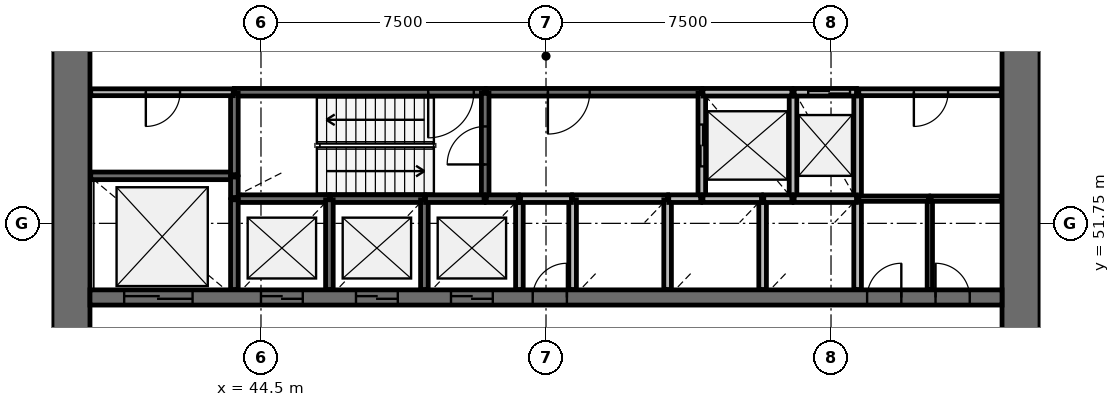
"""IFC4 building model, lengths in metres.
Left out: names, types, materials, properties, quantities, classifications, styles, units other than length and angle.
Written with IfcOpenShell. Run it as: python <this file> out.ifc"""

import sys

from ifc_helpers import new_model, si_unit, direction, frame, frame_2d, origin, place, context, subcontext, project, spatial, rectangle, extrude, source, transform, mapped, element, fill, save


model = new_model("IFC4")
c1 = context("Model", 3, precision=1e-05, world=origin(), true_north=direction((0.0, 1.0)))
c2 = subcontext(c1, "Body", "Model", "MODEL_VIEW")
j1 = project(units=[si_unit("LENGTHUNIT", "METRE"), si_unit("PLANEANGLEUNIT", "RADIAN")], contexts=[c1])
p1 = place(None, origin())
s1 = spatial("IfcSite", under=j1, at=p1, CompositionType="ELEMENT")
p2 = place(p1, origin())
s2 = spatial("IfcBuilding", under=s1, at=p2, CompositionType="ELEMENT")
p3 = place(p2, frame((0.0, 0.0, 35.8)))
s3 = spatial("IfcBuildingStorey", under=s2, at=p3, CompositionType="ELEMENT", Elevation=35.8)
p4 = place(p3, frame((64.5, 38.0, 0.0), z_axis=(0.0, 0.0, 1.0), x_axis=(0.0, 1.0, 0.0)))
e1 = element("IfcWall", 1, at=p4, inside=s3, PredefinedType="SHEAR", context=c2, shape_type="SweptSolid", body=[
    extrude(rectangle(XDim=20.0, YDim=1.0, at=frame_2d((10.0, 0.0))), origin(), (0.0, 0.0, 1.0), 4.4),
])
p5 = place(p4, frame((9.1, 0.0, 0.0)))
e2 = element("IfcOpeningElement", 2, at=p5, cuts=e1, PredefinedType="OPENING", context=c2, shape_type="SweptSolid", body=[
    extrude(rectangle(XDim=1.8, YDim=2.1, at=frame_2d((0.9, 1.05))), frame((0.0, 0.51, 0.0), z_axis=(0.0, -1.0, 0.0), x_axis=(1.0, 0.0, 0.0)), (0.0, 0.0, 1.0), 1.02),
])
p6 = place(p3, frame((39.5, 58.0, 0.0), z_axis=(0.0, 0.0, 1.0), x_axis=(0.0, -1.0, 0.0)))
e3 = element("IfcWall", 3, at=p6, inside=s3, PredefinedType="SHEAR", context=c2, shape_type="SweptSolid", body=[
    extrude(rectangle(XDim=20.0, YDim=1.0, at=frame_2d((10.0, 0.0))), origin(), (0.0, 0.0, 1.0), 4.4),
])
p7 = place(p6, frame((9.1, 0.0, 0.0)))
e4 = element("IfcOpeningElement", 4, at=p7, cuts=e3, PredefinedType="OPENING", context=c2, shape_type="SweptSolid", body=[
    extrude(rectangle(XDim=1.8, YDim=2.1, at=frame_2d((0.9, 1.05))), frame((0.0, 0.51, 0.0), z_axis=(0.0, -1.0, 0.0), x_axis=(1.0, 0.0, 0.0)), (0.0, 0.0, 1.0), 1.02),
])
p8 = place(p3, frame((40.0, 49.8, 0.0), z_axis=(0.0, 0.0, 1.0), x_axis=(1.0, 0.0, 0.0)))
e5 = element("IfcWall", 5, at=p8, inside=s3, PredefinedType="SHEAR", context=c2, shape_type="SweptSolid", body=[
    extrude(rectangle(XDim=24.0, YDim=0.4, at=frame_2d((12.0, 0.0))), origin(), (0.0, 0.0, 1.0), 4.4),
])
p9 = place(p8, frame((4.5, 0.0, 0.0)))
e6 = element("IfcOpeningElement", 6, at=p9, cuts=e5, PredefinedType="OPENING", context=c2, shape_type="SweptSolid", body=[
    extrude(rectangle(XDim=1.1, YDim=2.1, at=frame_2d((0.55, 1.05))), frame((0.0, 0.21, 0.0), z_axis=(0.0, -1.0, 0.0), x_axis=(1.0, 0.0, 0.0)), (0.0, 0.0, 1.0), 0.42),
])
p10 = place(p8, frame((7.0, 0.0, 0.0)))
e7 = element("IfcOpeningElement", 7, at=p10, cuts=e5, PredefinedType="OPENING", context=c2, shape_type="SweptSolid", body=[
    extrude(rectangle(XDim=1.1, YDim=2.1, at=frame_2d((0.55, 1.05))), frame((0.0, 0.21, 0.0), z_axis=(0.0, -1.0, 0.0), x_axis=(1.0, 0.0, 0.0)), (0.0, 0.0, 1.0), 0.42),
])
p11 = place(p8, frame((9.5, 0.0, 0.0)))
e8 = element("IfcOpeningElement", 8, at=p11, cuts=e5, PredefinedType="OPENING", context=c2, shape_type="SweptSolid", body=[
    extrude(rectangle(XDim=1.1, YDim=2.1, at=frame_2d((0.55, 1.05))), frame((0.0, 0.21, 0.0), z_axis=(0.0, -1.0, 0.0), x_axis=(1.0, 0.0, 0.0)), (0.0, 0.0, 1.0), 0.42),
])
p12 = place(p8, frame((0.9, 0.0, 0.0)))
e9 = element("IfcOpeningElement", 9, at=p12, cuts=e5, PredefinedType="OPENING", context=c2, shape_type="SweptSolid", body=[
    extrude(rectangle(XDim=1.8, YDim=2.4, at=frame_2d((0.9, 1.2))), frame((0.0, 0.21, 0.0), z_axis=(0.0, -1.0, 0.0), x_axis=(1.0, 0.0, 0.0)), (0.0, 0.0, 1.0), 0.42),
])
p13 = place(p8, frame((20.45, 0.0, 0.0)))
e10 = element("IfcOpeningElement", 10, at=p13, cuts=e5, PredefinedType="OPENING", context=c2, shape_type="SweptSolid", body=[
    extrude(rectangle(XDim=0.9, YDim=2.1, at=frame_2d((0.45, 1.05))), frame((0.0, 0.21, 0.0), z_axis=(0.0, -1.0, 0.0), x_axis=(1.0, 0.0, 0.0)), (0.0, 0.0, 1.0), 0.42),
])
p14 = place(p8, frame((22.25, 0.0, 0.0)))
e11 = element("IfcOpeningElement", 11, at=p14, cuts=e5, PredefinedType="OPENING", context=c2, shape_type="SweptSolid", body=[
    extrude(rectangle(XDim=0.9, YDim=2.1, at=frame_2d((0.45, 1.05))), frame((0.0, 0.21, 0.0), z_axis=(0.0, -1.0, 0.0), x_axis=(1.0, 0.0, 0.0)), (0.0, 0.0, 1.0), 0.42),
])
p15 = place(p8, frame((11.65, 0.0, 0.0)))
e12 = element("IfcOpeningElement", 12, at=p15, cuts=e5, PredefinedType="OPENING", context=c2, shape_type="SweptSolid", body=[
    extrude(rectangle(XDim=0.9, YDim=2.1, at=frame_2d((0.45, 1.05))), frame((0.0, 0.21, 0.0), z_axis=(0.0, -1.0, 0.0), x_axis=(1.0, 0.0, 0.0)), (0.0, 0.0, 1.0), 0.42),
])
p16 = place(p3, frame((50.4, 55.2, 0.0), z_axis=(0.0, 0.0, 1.0), x_axis=(-1.0, 0.0, 0.0)))
e13 = element("IfcWall", 13, at=p16, inside=s3, PredefinedType="SOLIDWALL", context=c2, shape_type="SweptSolid", body=[
    extrude(rectangle(XDim=6.6, YDim=0.2, at=frame_2d((3.3, 0.0))), origin(), (0.0, 0.0, 1.0), 3.95),
])
p17 = place(p16, frame((0.3, 0.0, 0.0)))
e14 = element("IfcOpeningElement", 14, at=p17, cuts=e13, PredefinedType="OPENING", context=c2, shape_type="SweptSolid", body=[
    extrude(rectangle(XDim=1.2, YDim=2.1, at=frame_2d((0.6, 1.05))), frame((0.0, 0.11, 0.0), z_axis=(0.0, -1.0, 0.0), x_axis=(1.0, 0.0, 0.0)), (0.0, 0.0, 1.0), 0.22),
])
p18 = place(p3, frame((56.1, 55.2, 0.0), z_axis=(0.0, 0.0, 1.0), x_axis=(-1.0, 0.0, 0.0)))
e15 = element("IfcWall", 15, at=p18, inside=s3, PredefinedType="SOLIDWALL", context=c2, shape_type="SweptSolid", body=[
    extrude(rectangle(XDim=5.67, YDim=0.2, at=frame_2d((2.835, 0.0))), origin(), (0.0, 0.0, 1.0), 3.95),
])
p19 = place(p18, frame((2.95, 0.0, 0.0)))
e16 = element("IfcOpeningElement", 16, at=p19, cuts=e15, PredefinedType="OPENING", context=c2, shape_type="SweptSolid", body=[
    extrude(rectangle(XDim=1.1, YDim=2.1, at=frame_2d((0.55, 1.05))), frame((0.0, 0.11, 0.0), z_axis=(0.0, -1.0, 0.0), x_axis=(1.0, 0.0, 0.0)), (0.0, 0.0, 1.0), 0.22),
])
p20 = place(p3, frame((43.8, 53.0, 0.0), z_axis=(0.0, 0.0, 1.0), x_axis=(-1.0, 0.0, 0.0)))
e17 = element("IfcWall", 17, at=p20, inside=s3, PredefinedType="SOLIDWALL", context=c2, shape_type="SweptSolid", body=[
    extrude(rectangle(XDim=3.78, YDim=0.2, at=frame_2d((1.89, 0.0))), origin(), (0.0, 0.0, 1.0), 3.95),
])
p21 = place(p3, frame((50.4, 52.4, 0.0), z_axis=(0.0, 0.0, 1.0), x_axis=(0.0, 1.0, 0.0)))
e18 = element("IfcWall", 18, at=p21, inside=s3, PredefinedType="SOLIDWALL", context=c2, shape_type="SweptSolid", body=[
    extrude(rectangle(XDim=2.77, YDim=0.2, at=frame_2d((1.385, 0.0))), origin(), (0.0, 0.0, 1.0), 3.95),
])
p22 = place(p21, frame((0.9, 0.0, 0.0)))
e19 = element("IfcOpeningElement", 19, at=p22, cuts=e18, PredefinedType="OPENING", context=c2, shape_type="SweptSolid", body=[
    extrude(rectangle(XDim=1.0, YDim=2.1, at=frame_2d((0.5, 1.05))), frame((0.0, 0.11, 0.0), z_axis=(0.0, -1.0, 0.0), x_axis=(1.0, 0.0, 0.0)), (0.0, 0.0, 1.0), 0.22),
])
p23 = place(p3, frame((56.1, 55.17, 0.0), z_axis=(0.0, 0.0, 1.0), x_axis=(0.0, -1.0, 0.0)))
e20 = element("IfcWall", 20, at=p23, inside=s3, PredefinedType="SOLIDWALL", context=c2, shape_type="SweptSolid", body=[
    extrude(rectangle(XDim=2.77, YDim=0.2, at=frame_2d((1.385, 0.0))), origin(), (0.0, 0.0, 1.0), 3.95),
])
p24 = place(p23, frame((0.82, 0.0, 0.0)))
e21 = element("IfcOpeningElement", 21, at=p24, cuts=e20, PredefinedType="OPENING", context=c2, shape_type="SweptSolid", body=[
    extrude(rectangle(XDim=1.1, YDim=2.1, at=frame_2d((0.55, 1.05))), frame((0.0, 0.11, 0.0), z_axis=(0.0, -1.0, 0.0), x_axis=(1.0, 0.0, 0.0)), (0.0, 0.0, 1.0), 0.22),
])
for number, where, z_axis, x_axis in (
    (22, (58.5, 52.4, 0.0), (0.0, 0.0, 1.0), (0.0, 1.0, 0.0)),
    (23, (60.2, 52.4, 0.0), (0.0, 0.0, 1.0), (0.0, 1.0, 0.0)),
):
    element("IfcWall", number, at=place(p3, frame(where, z_axis=z_axis, x_axis=x_axis)), inside=s3, PredefinedType="SOLIDWALL", context=c2, shape_type="SweptSolid", body=[
        extrude(rectangle(XDim=2.8, YDim=0.2, at=frame_2d((1.4, 0.0))), origin(), (0.0, 0.0, 1.0), 3.95),
    ])
p25 = place(p3, frame((46.3, 52.4, 0.0), z_axis=(0.0, 0.0, 1.0), x_axis=(-1.0, 0.0, 0.0)))
e24 = element("IfcWall", 24, at=p25, inside=s3, PredefinedType="SOLIDWALL", context=c2, shape_type="SweptSolid", body=[
    extrude(rectangle(XDim=2.5, YDim=0.2, at=frame_2d((1.25, 0.0))), origin(), (0.0, 0.0, 1.0), 3.95),
])
p26 = place(p3, frame((48.8, 52.4, 0.0), z_axis=(0.0, 0.0, 1.0), x_axis=(-1.0, 0.0, 0.0)))
e25 = element("IfcWall", 25, at=p26, inside=s3, PredefinedType="SOLIDWALL", context=c2, shape_type="SweptSolid", body=[
    extrude(rectangle(XDim=2.47, YDim=0.2, at=frame_2d((1.235, 0.0))), origin(), (0.0, 0.0, 1.0), 3.95),
])
p27 = place(p3, frame((55.2, 52.4, 0.0), z_axis=(0.0, 0.0, 1.0), x_axis=(-1.0, 0.0, 0.0)))
e26 = element("IfcWall", 26, at=p27, inside=s3, PredefinedType="SOLIDWALL", context=c2, shape_type="SweptSolid", body=[
    extrude(rectangle(XDim=2.5, YDim=0.2, at=frame_2d((1.25, 0.0))), origin(), (0.0, 0.0, 1.0), 3.95),
])
p28 = place(p3, frame((58.47, 55.2, 0.0), z_axis=(0.0, 0.0, 1.0), x_axis=(-1.0, 0.0, 0.0)))
e27 = element("IfcWall", 27, at=p28, inside=s3, PredefinedType="SOLIDWALL", context=c2, shape_type="SweptSolid", body=[
    extrude(rectangle(XDim=2.34, YDim=0.2, at=frame_2d((1.17, 0.0))), origin(), (0.0, 0.0, 1.0), 3.95),
])
for number, where, z_axis, x_axis in (
    (28, (43.8, 52.37, 0.0), (0.0, 0.0, 1.0), (0.0, -1.0, 0.0)),
    (29, (46.3, 50.01, 0.0), (0.0, 0.0, 1.0), (0.0, 1.0, 0.0)),
    (30, (48.8, 50.01, 0.0), (0.0, 0.0, 1.0), (0.0, 1.0, 0.0)),
):
    element("IfcWall", number, at=place(p3, frame(where, z_axis=z_axis, x_axis=x_axis)), inside=s3, PredefinedType="SOLIDWALL", context=c2, shape_type="SweptSolid", body=[
        extrude(rectangle(XDim=2.36, YDim=0.2, at=frame_2d((1.18, 0.0))), origin(), (0.0, 0.0, 1.0), 3.95),
    ])
p29 = place(p3, frame((51.3, 50.01, 0.0), z_axis=(0.0, 0.0, 1.0), x_axis=(0.0, 1.0, 0.0)))
e31 = element("IfcWall", 31, at=p29, inside=s3, PredefinedType="SOLIDWALL", context=c2, shape_type="SweptSolid", body=[
    extrude(rectangle(XDim=2.39, YDim=0.2, at=frame_2d((1.195, 0.0))), origin(), (0.0, 0.0, 1.0), 3.95),
])
for number, where, z_axis, x_axis in (
    (32, (52.7, 52.37, 0.0), (0.0, 0.0, 1.0), (0.0, -1.0, 0.0)),
    (33, (55.2, 50.01, 0.0), (0.0, 0.0, 1.0), (0.0, 1.0, 0.0)),
):
    element("IfcWall", number, at=place(p3, frame(where, z_axis=z_axis, x_axis=x_axis)), inside=s3, PredefinedType="SOLIDWALL", context=c2, shape_type="SweptSolid", body=[
        extrude(rectangle(XDim=2.36, YDim=0.2, at=frame_2d((1.18, 0.0))), origin(), (0.0, 0.0, 1.0), 3.95),
    ])
p30 = place(p3, frame((57.7, 50.01, 0.0), z_axis=(0.0, 0.0, 1.0), x_axis=(0.0, 1.0, 0.0)))
e34 = element("IfcWall", 34, at=p30, inside=s3, PredefinedType="SOLIDWALL", context=c2, shape_type="SweptSolid", body=[
    extrude(rectangle(XDim=2.39, YDim=0.2, at=frame_2d((1.195, 0.0))), origin(), (0.0, 0.0, 1.0), 3.95),
])
p31 = place(p3, frame((60.2, 50.01, 0.0), z_axis=(0.0, 0.0, 1.0), x_axis=(0.0, 1.0, 0.0)))
e35 = element("IfcWall", 35, at=p31, inside=s3, PredefinedType="SOLIDWALL", context=c2, shape_type="SweptSolid", body=[
    extrude(rectangle(XDim=2.36, YDim=0.2, at=frame_2d((1.18, 0.0))), origin(), (0.0, 0.0, 1.0), 3.95),
])
p32 = place(p3, frame((43.8, 55.17, 0.0), z_axis=(0.0, 0.0, 1.0), x_axis=(0.0, -1.0, 0.0)))
e36 = element("IfcWall", 36, at=p32, inside=s3, PredefinedType="SOLIDWALL", context=c2, shape_type="SweptSolid", body=[
    extrude(rectangle(XDim=2.14, YDim=0.2, at=frame_2d((1.07, 0.0))), origin(), (0.0, 0.0, 1.0), 3.95),
])
p33 = place(p3, frame((60.17, 52.4, 0.0), z_axis=(0.0, 0.0, 1.0), x_axis=(-1.0, 0.0, 0.0)))
e37 = element("IfcWall", 37, at=p33, inside=s3, PredefinedType="SOLIDWALL", context=c2, shape_type="SweptSolid", body=[
    extrude(rectangle(XDim=1.64, YDim=0.2, at=frame_2d((0.82, 0.0))), origin(), (0.0, 0.0, 1.0), 3.95),
])
p34 = place(p3, frame((60.17, 55.2, 0.0), z_axis=(0.0, 0.0, 1.0), x_axis=(-1.0, 0.0, 0.0)))
e38 = element("IfcWall", 38, at=p34, inside=s3, PredefinedType="SOLIDWALL", context=c2, shape_type="SweptSolid", body=[
    extrude(rectangle(XDim=1.64, YDim=0.2, at=frame_2d((0.82, 0.0))), origin(), (0.0, 0.0, 1.0), 3.95),
])
p35 = place(p34, frame((0.17, 0.0, 0.0)))
e39 = element("IfcOpeningElement", 39, at=p35, cuts=e38, PredefinedType="OPENING", context=c2, shape_type="SweptSolid", body=[
    extrude(rectangle(XDim=1.1, YDim=2.1, at=frame_2d((0.55, 1.05))), frame((0.0, 0.11, 0.0), z_axis=(0.0, -1.0, 0.0), x_axis=(1.0, 0.0, 0.0)), (0.0, 0.0, 1.0), 0.22),
])
for number, where, z_axis, x_axis in (
    (40, (50.37, 52.4, 0.0), (0.0, 0.0, 1.0), (-1.0, 0.0, 0.0)),
    (41, (57.67, 52.4, 0.0), (0.0, 0.0, 1.0), (-1.0, 0.0, 0.0)),
):
    element("IfcWall", number, at=place(p3, frame(where, z_axis=z_axis, x_axis=x_axis)), inside=s3, PredefinedType="SOLIDWALL", context=c2, shape_type="SweptSolid", body=[
        extrude(rectangle(XDim=1.54, YDim=0.2, at=frame_2d((0.77, 0.0))), origin(), (0.0, 0.0, 1.0), 3.95),
    ])
p36 = place(p3, frame((51.33, 52.4, 0.0), z_axis=(0.0, 0.0, 1.0), x_axis=(1.0, 0.0, 0.0)))
e42 = element("IfcWall", 42, at=p36, inside=s3, PredefinedType="SOLIDWALL", context=c2, shape_type="SweptSolid", body=[
    extrude(rectangle(XDim=1.34, YDim=0.2, at=frame_2d((0.67, 0.0))), origin(), (0.0, 0.0, 1.0), 3.95),
])
for number, where, z_axis, x_axis in (
    (43, (51.27, 52.4, 0.0), (0.0, 0.0, 1.0), (-1.0, 0.0, 0.0)),
    (44, (56.07, 52.4, 0.0), (0.0, 0.0, 1.0), (-1.0, 0.0, 0.0)),
):
    element("IfcWall", number, at=place(p3, frame(where, z_axis=z_axis, x_axis=x_axis)), inside=s3, PredefinedType="SOLIDWALL", context=c2, shape_type="SweptSolid", body=[
        extrude(rectangle(XDim=0.84, YDim=0.2, at=frame_2d((0.42, 0.0))), origin(), (0.0, 0.0, 1.0), 3.95),
    ])
p37 = place(p3, frame((58.47, 52.4, 0.0), z_axis=(0.0, 0.0, 1.0), x_axis=(-1.0, 0.0, 0.0)))
e45 = element("IfcWall", 45, at=p37, inside=s3, PredefinedType="SOLIDWALL", context=c2, shape_type="SweptSolid", body=[
    extrude(rectangle(XDim=0.74, YDim=0.2, at=frame_2d((0.37, 0.0))), origin(), (0.0, 0.0, 1.0), 3.95),
])
p38 = place(p3, frame((43.8, 52.43, 0.0), z_axis=(0.0, 0.0, 1.0), x_axis=(0.0, 1.0, 0.0)))
e46 = element("IfcWall", 46, at=p38, inside=s3, PredefinedType="SOLIDWALL", context=c2, shape_type="SweptSolid", body=[
    extrude(rectangle(XDim=0.54, YDim=0.2, at=frame_2d((0.27, 0.0))), origin(), (0.0, 0.0, 1.0), 3.95),
])
p39 = place(p3, frame((43.77, 55.2, 0.0), z_axis=(0.0, 0.0, 1.0), x_axis=(-1.0, 0.0, 0.0)))
e47 = element("IfcWall", 47, at=p39, inside=s3, PredefinedType="PARTITIONING", context=c2, shape_type="SweptSolid", body=[
    extrude(rectangle(XDim=3.75, YDim=0.18, at=frame_2d((1.875, 0.0))), origin(), (0.0, 0.0, 1.0), 3.95),
])
p40 = place(p39, frame((1.4, 0.0, 0.0)))
e48 = element("IfcOpeningElement", 48, at=p40, cuts=e47, PredefinedType="OPENING", context=c2, shape_type="SweptSolid", body=[
    extrude(rectangle(XDim=0.9, YDim=2.1, at=frame_2d((0.45, 1.05))), frame((0.0, 0.1, 0.0), z_axis=(0.0, -1.0, 0.0), x_axis=(1.0, 0.0, 0.0)), (0.0, 0.0, 1.0), 0.2),
])
p41 = place(p3, frame((63.98, 55.2, 0.0), z_axis=(0.0, 0.0, 1.0), x_axis=(-1.0, 0.0, 0.0)))
e49 = element("IfcWall", 49, at=p41, inside=s3, PredefinedType="PARTITIONING", context=c2, shape_type="SweptSolid", body=[
    extrude(rectangle(XDim=3.75, YDim=0.18, at=frame_2d((1.875, 0.0))), origin(), (0.0, 0.0, 1.0), 3.95),
])
p42 = place(p41, frame((1.4, 0.0, 0.0)))
e50 = element("IfcOpeningElement", 50, at=p42, cuts=e49, PredefinedType="OPENING", context=c2, shape_type="SweptSolid", body=[
    extrude(rectangle(XDim=0.9, YDim=2.1, at=frame_2d((0.45, 1.05))), frame((0.0, 0.1, 0.0), z_axis=(0.0, -1.0, 0.0), x_axis=(1.0, 0.0, 0.0)), (0.0, 0.0, 1.0), 0.2),
])
p43 = place(p3, frame((62.1, 50.01, 0.0), z_axis=(0.0, 0.0, 1.0), x_axis=(0.0, 1.0, 0.0)))
e51 = element("IfcWall", 51, at=p43, inside=s3, PredefinedType="PARTITIONING", context=c2, shape_type="SweptSolid", body=[
    extrude(rectangle(XDim=2.39, YDim=0.14, at=frame_2d((1.195, 0.0))), origin(), (0.0, 0.0, 1.0), 3.05),
])
p44 = place(p3, frame((62.07, 52.4, 0.0), z_axis=(0.0, 0.0, 1.0), x_axis=(-1.0, 0.0, 0.0)))
e52 = element("IfcWall", 52, at=p44, inside=s3, PredefinedType="PARTITIONING", context=c2, shape_type="SweptSolid", body=[
    extrude(rectangle(XDim=1.84, YDim=0.14, at=frame_2d((0.92, 0.0))), origin(), (0.0, 0.0, 1.0), 3.05),
])
p45 = place(p3, frame((63.98, 52.4, 0.0), z_axis=(0.0, 0.0, 1.0), x_axis=(-1.0, 0.0, 0.0)))
e53 = element("IfcWall", 53, at=p45, inside=s3, PredefinedType="PARTITIONING", context=c2, shape_type="SweptSolid", body=[
    extrude(rectangle(XDim=1.85, YDim=0.14, at=frame_2d((0.925, 0.0))), origin(), (0.0, 0.0, 1.0), 3.05),
])
m1 = source(origin(), c2, "Body", "SweptSolid", [
    extrude(rectangle(XDim=1.1, YDim=2.1, at=frame_2d((0.55, 1.05))), frame((0.0, 0.025, 0.0), z_axis=(0.0, -1.0, 0.0), x_axis=(1.0, 0.0, 0.0)), (0.0, 0.0, 1.0), 0.05),
])
p46 = place(p9, origin())
e54 = element("IfcDoor", 54, at=p46, inside=s3, OperationType="DOUBLE_DOOR_SLIDING", PredefinedType="USERDEFINED", context=c2, shape_type="MappedRepresentation", body=[
    mapped(m1, transform((0.0, 0.0, 0.0), scale=1.0)),
])
fill(e6, e54)
p47 = place(p10, origin())
e55 = element("IfcDoor", 55, at=p47, inside=s3, OperationType="DOUBLE_DOOR_SLIDING", PredefinedType="USERDEFINED", context=c2, shape_type="MappedRepresentation", body=[
    mapped(m1, transform((0.0, 0.0, 0.0), scale=1.0)),
])
fill(e7, e55)
p48 = place(p11, origin())
e56 = element("IfcDoor", 56, at=p48, inside=s3, OperationType="DOUBLE_DOOR_SLIDING", PredefinedType="USERDEFINED", context=c2, shape_type="MappedRepresentation", body=[
    mapped(m1, transform((0.0, 0.0, 0.0), scale=1.0)),
])
fill(e8, e56)
p49 = place(p24, origin())
e57 = element("IfcDoor", 57, at=p49, inside=s3, OperationType="DOUBLE_DOOR_SLIDING", PredefinedType="USERDEFINED", context=c2, shape_type="MappedRepresentation", body=[
    mapped(m1, transform((0.0, 0.0, 0.0), scale=1.0)),
])
fill(e21, e57)
p50 = place(p35, origin())
e58 = element("IfcDoor", 58, at=p50, inside=s3, OperationType="DOUBLE_DOOR_SLIDING", PredefinedType="USERDEFINED", context=c2, shape_type="MappedRepresentation", body=[
    mapped(m1, transform((0.0, 0.0, 0.0), scale=1.0)),
])
fill(e39, e58)
m2 = source(origin(), c2, "Body", "SweptSolid", [
    extrude(rectangle(XDim=1.8, YDim=2.4, at=frame_2d((0.9, 1.2))), frame((0.0, 0.025, 0.0), z_axis=(0.0, -1.0, 0.0), x_axis=(1.0, 0.0, 0.0)), (0.0, 0.0, 1.0), 0.05),
])
p51 = place(p12, origin())
e59 = element("IfcDoor", 59, at=p51, inside=s3, OperationType="DOUBLE_DOOR_SLIDING", PredefinedType="USERDEFINED", context=c2, shape_type="MappedRepresentation", body=[
    mapped(m2, transform((0.0, 0.0, 0.0), scale=1.0)),
])
fill(e9, e59)
m3 = source(origin(), c2, "Body", "SweptSolid", [
    extrude(rectangle(XDim=1.2, YDim=2.1, at=frame_2d((0.6, 1.05))), frame((0.0, 0.025, 0.0), z_axis=(0.0, -1.0, 0.0), x_axis=(1.0, 0.0, 0.0)), (0.0, 0.0, 1.0), 0.05),
])
p52 = place(p17, origin())
e60 = element("IfcDoor", 60, at=p52, inside=s3, OperationType="SINGLE_SWING_RIGHT", PredefinedType="DOOR", context=c2, shape_type="MappedRepresentation", body=[
    mapped(m3, transform((0.0, 0.0, 0.0), scale=1.0)),
])
fill(e14, e60)
m4 = source(origin(), c2, "Body", "SweptSolid", [
    extrude(rectangle(XDim=1.0, YDim=2.1, at=frame_2d((0.5, 1.05))), frame((0.0, 0.025, 0.0), z_axis=(0.0, -1.0, 0.0), x_axis=(1.0, 0.0, 0.0)), (0.0, 0.0, 1.0), 0.05),
])
p53 = place(p22, origin())
e61 = element("IfcDoor", 61, at=p53, inside=s3, OperationType="SINGLE_SWING_LEFT", PredefinedType="DOOR", context=c2, shape_type="MappedRepresentation", body=[
    mapped(m4, transform((0.0, 0.0, 0.0), scale=1.0)),
])
fill(e19, e61)
m5 = source(origin(), c2, "Body", "SweptSolid", [
    extrude(rectangle(XDim=1.1, YDim=2.1, at=frame_2d((0.55, 1.05))), frame((0.0, 0.025, 0.0), z_axis=(0.0, -1.0, 0.0), x_axis=(1.0, 0.0, 0.0)), (0.0, 0.0, 1.0), 0.05),
])
p54 = place(p19, origin())
e62 = element("IfcDoor", 62, at=p54, inside=s3, OperationType="SINGLE_SWING_RIGHT", PredefinedType="DOOR", context=c2, shape_type="MappedRepresentation", body=[
    mapped(m5, transform((0.0, 0.0, 0.0), scale=1.0)),
])
fill(e16, e62)
m6 = source(origin(), c2, "Body", "SweptSolid", [
    extrude(rectangle(XDim=0.9, YDim=2.1, at=frame_2d((0.45, 1.05))), frame((0.0, 0.025, 0.0), z_axis=(0.0, -1.0, 0.0), x_axis=(1.0, 0.0, 0.0)), (0.0, 0.0, 1.0), 0.05),
])
p55 = place(p40, origin())
e63 = element("IfcDoor", 63, at=p55, inside=s3, OperationType="SINGLE_SWING_RIGHT", PredefinedType="DOOR", context=c2, shape_type="MappedRepresentation", body=[
    mapped(m6, transform((0.0, 0.0, 0.0), scale=1.0)),
])
fill(e48, e63)
p56 = place(p13, origin())
e64 = element("IfcDoor", 64, at=p56, inside=s3, OperationType="SINGLE_SWING_RIGHT", PredefinedType="DOOR", context=c2, shape_type="MappedRepresentation", body=[
    mapped(m6, transform((0.0, 0.0, 0.0), scale=1.0)),
])
fill(e10, e64)
p57 = place(p14, origin())
e65 = element("IfcDoor", 65, at=p57, inside=s3, OperationType="SINGLE_SWING_LEFT", PredefinedType="DOOR", context=c2, shape_type="MappedRepresentation", body=[
    mapped(m6, transform((0.0, 0.0, 0.0), scale=1.0)),
])
fill(e11, e65)
p58 = place(p42, origin())
e66 = element("IfcDoor", 66, at=p58, inside=s3, OperationType="SINGLE_SWING_RIGHT", PredefinedType="DOOR", context=c2, shape_type="MappedRepresentation", body=[
    mapped(m6, transform((0.0, 0.0, 0.0), scale=1.0)),
])
fill(e50, e66)
p59 = place(p15, origin())
e67 = element("IfcDoor", 67, at=p59, inside=s3, OperationType="SINGLE_SWING_RIGHT", PredefinedType="DOOR", context=c2, shape_type="MappedRepresentation", body=[
    mapped(m6, transform((0.0, 0.0, 0.0), scale=1.0)),
])
fill(e12, e67)
save(model, sys.argv[1])
